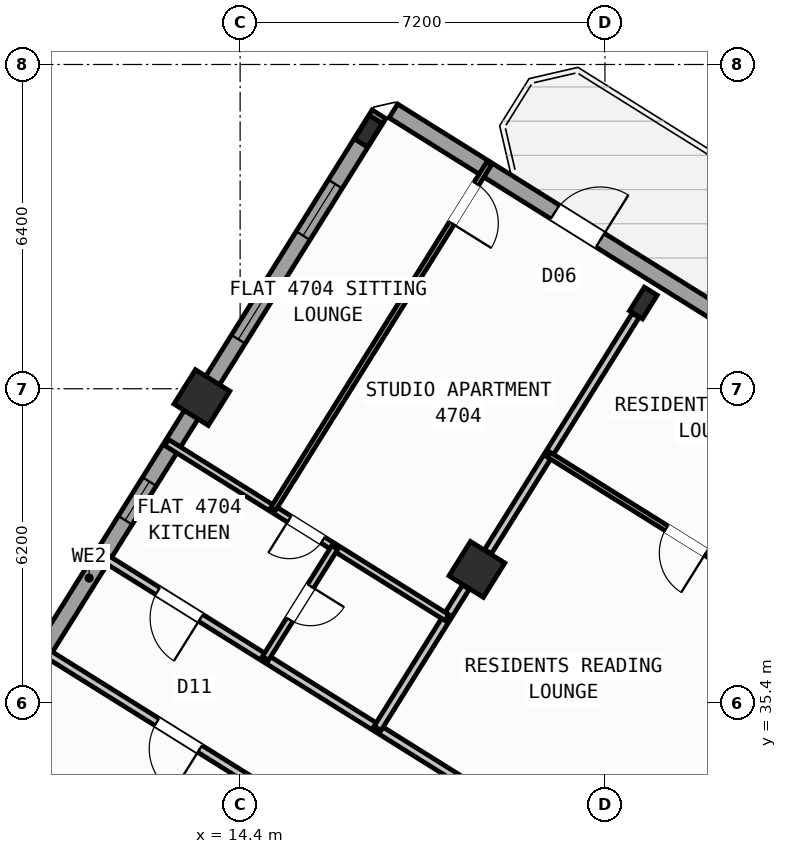
"""IFC4 building model, lengths in metres.
Left out: names, types, materials, properties, quantities, classifications, styles, units other than length and angle.
Written with IfcOpenShell. Run it as: python <this file> out.ifc"""

import sys

from ifc_helpers import new_model, si_unit, direction, frame, frame_2d, origin, origin_2d, place, context, subcontext, project, spatial, rectangle, hollow_rectangle, i_section, extrude, source, transform, mapped, element, fill, save


model = new_model("IFC4")
c1 = context("Model", 3, precision=1e-05, world=origin(), true_north=direction((0.0, 1.0)))
c2 = subcontext(c1, "Body", "Model", "MODEL_VIEW")
j1 = project(units=[si_unit("LENGTHUNIT", "METRE"), si_unit("PLANEANGLEUNIT", "RADIAN")], contexts=[c1])
p1 = place(None, origin())
s1 = spatial("IfcSite", under=j1, at=p1, CompositionType="ELEMENT")
p2 = place(p1, origin())
s2 = spatial("IfcBuilding", under=s1, at=p2, CompositionType="ELEMENT")
p3 = place(p2, frame((0.0, 0.0, 187.8)))
s3 = spatial("IfcBuildingStorey", under=s2, at=p3, CompositionType="ELEMENT", Elevation=187.8)
m1 = source(origin(), c2, "Body", "SweptSolid", [
    extrude(i_section(OverallWidth=0.3, OverallDepth=0.55, WebThickness=0.015, FlangeThickness=0.029, at=origin_2d()), origin(), (0.0, 0.0, 1.0), 3.6),
])
p4 = place(p3, frame((22.358, 43.292, 0.0), z_axis=(0.0, 0.0, 1.0), x_axis=(-0.848048096156, 0.529919264233, 0.0)))
e1 = element("IfcColumn", 1, at=p4, inside=s3, PredefinedType="COLUMN", context=c2, shape_type="MappedRepresentation", body=[
    mapped(m1, transform((0.0, 0.0, 0.0), scale=1.0)),
])
m2 = source(origin(), c2, "Body", "SweptSolid", [
    extrude(hollow_rectangle(XDim=0.8, YDim=0.8, WallThickness=0.032, at=origin_2d()), origin(), (0.0, 0.0, 1.0), 3.6),
])
p5 = place(p3, frame((19.073, 38.034, 0.0), z_axis=(0.0, 0.0, 1.0), x_axis=(-0.848048096156, 0.529919264233, 0.0)))
e2 = element("IfcColumn", 2, at=p5, inside=s3, PredefinedType="COLUMN", context=c2, shape_type="MappedRepresentation", body=[
    mapped(m2, transform((0.0, 0.0, 0.0), scale=1.0)),
])
p6 = place(p3, frame((16.931, 46.684, 0.0), z_axis=(0.0, 0.0, 1.0), x_axis=(-0.848048096156, 0.529919264233, 0.0)))
e3 = element("IfcColumn", 3, at=p6, inside=s3, PredefinedType="COLUMN", context=c2, shape_type="MappedRepresentation", body=[
    mapped(m1, transform((0.0, 0.0, 0.0), scale=1.0)),
])
p7 = place(p3, frame((13.646, 41.426, 0.0), z_axis=(0.0, 0.0, 1.0), x_axis=(-0.848048096156, 0.529919264233, 0.0)))
e4 = element("IfcColumn", 4, at=p7, inside=s3, PredefinedType="COLUMN", context=c2, shape_type="MappedRepresentation", body=[
    mapped(m2, transform((0.0, 0.0, 0.0), scale=1.0)),
])
p8 = place(p3, frame((5.7, 28.71, 0.0), z_axis=(0.0, 0.0, 1.0), x_axis=(0.529923711467, 0.8480453172, 0.0)))
e5 = element("IfcWall", 5, at=p8, inside=s3, PredefinedType="STANDARD", context=c2, shape_type="SweptSolid", body=[
    extrude(rectangle(XDim=21.587, YDim=0.32, at=frame_2d((10.794, 0.0))), origin(), (0.0, 0.0, 1.0), 2.825),
])
p9 = place(p8, frame((1.44, 0.0, 0.95)))
e6 = element("IfcOpeningElement", 6, at=p9, cuts=e5, PredefinedType="OPENING", context=c2, shape_type="SweptSolid", body=[
    extrude(rectangle(XDim=1.2, YDim=1.4, at=frame_2d((0.6, 0.7))), frame((0.0, 0.17, 0.0), z_axis=(0.0, -1.0, 0.0), x_axis=(1.0, 0.0, 0.0)), (0.0, 0.0, 1.0), 0.34),
])
p10 = place(p8, frame((4.545, 0.0, 0.85)))
e7 = element("IfcOpeningElement", 7, at=p10, cuts=e5, PredefinedType="OPENING", context=c2, shape_type="SweptSolid", body=[
    extrude(rectangle(XDim=1.8, YDim=1.5, at=frame_2d((0.9, 0.75))), frame((0.0, 0.17, 0.0), z_axis=(0.0, -1.0, 0.0), x_axis=(1.0, 0.0, 0.0)), (0.0, 0.0, 1.0), 0.34),
])
p11 = place(p8, frame((12.139, 0.0, 1.0)))
e8 = element("IfcOpeningElement", 8, at=p11, cuts=e5, PredefinedType="OPENING", context=c2, shape_type="SweptSolid", body=[
    extrude(rectangle(XDim=0.9, YDim=1.25, at=frame_2d((0.45, 0.625))), frame((0.0, 0.17, 0.0), z_axis=(0.0, -1.0, 0.0), x_axis=(1.0, 0.0, 0.0)), (0.0, 0.0, 1.0), 0.34),
])
p12 = place(p8, frame((16.35, 0.0, 0.95)))
e9 = element("IfcOpeningElement", 9, at=p12, cuts=e5, PredefinedType="OPENING", context=c2, shape_type="SweptSolid", body=[
    extrude(rectangle(XDim=1.2, YDim=1.4, at=frame_2d((0.6, 0.7))), frame((0.0, 0.17, 0.0), z_axis=(0.0, -1.0, 0.0), x_axis=(1.0, 0.0, 0.0)), (0.0, 0.0, 1.0), 0.34),
])
p13 = place(p8, frame((18.762, 0.0, 0.95)))
e10 = element("IfcOpeningElement", 10, at=p13, cuts=e5, PredefinedType="OPENING", context=c2, shape_type="SweptSolid", body=[
    extrude(rectangle(XDim=1.2, YDim=1.4, at=frame_2d((0.6, 0.7))), frame((0.0, 0.17, 0.0), z_axis=(0.0, -1.0, 0.0), x_axis=(1.0, 0.0, 0.0)), (0.0, 0.0, 1.0), 0.34),
])
p14 = place(p3, frame((17.424, 47.083, 0.0), z_axis=(0.0, 0.0, 1.0), x_axis=(0.848049927979, -0.529916332693, 0.0)))
e11 = element("IfcWall", 11, at=p14, inside=s3, PredefinedType="STANDARD", context=c2, shape_type="SweptSolid", body=[
    extrude(rectangle(XDim=29.223, YDim=0.32, at=frame_2d((14.612, 0.0))), origin(), (0.0, 0.0, 1.0), 3.35),
])
p15 = place(p14, frame((3.764, 0.0, 0.0)))
e12 = element("IfcOpeningElement", 12, at=p15, cuts=e11, PredefinedType="OPENING", context=c2, shape_type="SweptSolid", body=[
    extrude(rectangle(XDim=1.05, YDim=2.15, at=frame_2d((0.525, 1.075))), frame((0.0, 0.17, 0.0), z_axis=(0.0, -1.0, 0.0), x_axis=(1.0, 0.0, 0.0)), (0.0, 0.0, 1.0), 0.34),
])
p16 = place(p14, frame((8.344, 0.0, 0.8)))
e13 = element("IfcOpeningElement", 13, at=p16, cuts=e11, PredefinedType="OPENING", context=c2, shape_type="SweptSolid", body=[
    extrude(rectangle(XDim=2.1, YDim=1.55, at=frame_2d((1.05, 0.775))), frame((0.0, 0.17, 0.0), z_axis=(0.0, -1.0, 0.0), x_axis=(1.0, 0.0, 0.0)), (0.0, 0.0, 1.0), 0.34),
])
p17 = place(p14, frame((13.589, 0.0, 0.85)))
e14 = element("IfcOpeningElement", 14, at=p17, cuts=e11, PredefinedType="OPENING", context=c2, shape_type="SweptSolid", body=[
    extrude(rectangle(XDim=1.8, YDim=1.5, at=frame_2d((0.9, 0.75))), frame((0.0, 0.17, 0.0), z_axis=(0.0, -1.0, 0.0), x_axis=(1.0, 0.0, 0.0)), (0.0, 0.0, 1.0), 0.34),
])
p18 = place(p14, frame((17.104, 0.0, 0.95)))
e15 = element("IfcOpeningElement", 15, at=p18, cuts=e11, PredefinedType="OPENING", context=c2, shape_type="SweptSolid", body=[
    extrude(rectangle(XDim=1.2, YDim=1.4, at=frame_2d((0.6, 0.7))), frame((0.0, 0.17, 0.0), z_axis=(0.0, -1.0, 0.0), x_axis=(1.0, 0.0, 0.0)), (0.0, 0.0, 1.0), 0.34),
])
p19 = place(p14, frame((21.214, 0.0, 0.95)))
e16 = element("IfcOpeningElement", 16, at=p19, cuts=e11, PredefinedType="OPENING", context=c2, shape_type="SweptSolid", body=[
    extrude(rectangle(XDim=1.2, YDim=1.4, at=frame_2d((0.6, 0.7))), frame((0.0, 0.17, 0.0), z_axis=(0.0, -1.0, 0.0), x_axis=(1.0, 0.0, 0.0)), (0.0, 0.0, 1.0), 0.34),
])
p20 = place(p14, frame((25.853, 0.0, 0.95)))
e17 = element("IfcOpeningElement", 17, at=p20, cuts=e11, PredefinedType="OPENING", context=c2, shape_type="SweptSolid", body=[
    extrude(rectangle(XDim=1.2, YDim=1.4, at=frame_2d((0.6, 0.7))), frame((0.0, 0.17, 0.0), z_axis=(0.0, -1.0, 0.0), x_axis=(1.0, 0.0, 0.0)), (0.0, 0.0, 1.0), 0.34),
])
p21 = place(p3, frame((25.754, 29.497, 0.0), z_axis=(0.0, 0.0, 1.0), x_axis=(-0.848045850158, 0.529922858565, 0.0)))
e18 = element("IfcWall", 18, at=p21, inside=s3, PredefinedType="PARTITIONING", context=c2, shape_type="SweptSolid", body=[
    extrude(rectangle(XDim=16.73, YDim=0.16, at=frame_2d((8.365, 0.0))), origin(), (0.0, 0.0, 1.0), 3.34),
])
p22 = place(p21, frame((2.22, 0.0, 0.0)))
e19 = element("IfcOpeningElement", 19, at=p22, cuts=e18, PredefinedType="OPENING", context=c2, shape_type="SweptSolid", body=[
    extrude(rectangle(XDim=0.86, YDim=2.05, at=frame_2d((0.43, 1.025))), frame((0.0, 0.09, 0.0), z_axis=(0.0, -1.0, 0.0), x_axis=(1.0, 0.0, 0.0)), (0.0, 0.0, 1.0), 0.18),
])
p23 = place(p21, frame((6.49, 0.0, 0.0)))
e20 = element("IfcOpeningElement", 20, at=p23, cuts=e18, PredefinedType="OPENING", context=c2, shape_type="SweptSolid", body=[
    extrude(rectangle(XDim=1.0, YDim=2.1, at=frame_2d((0.5, 1.05))), frame((0.0, 0.09, 0.0), z_axis=(0.0, -1.0, 0.0), x_axis=(1.0, 0.0, 0.0)), (0.0, 0.0, 1.0), 0.18),
])
p24 = place(p21, frame((14.304, 0.0, 0.0)))
e21 = element("IfcOpeningElement", 21, at=p24, cuts=e18, PredefinedType="OPENING", context=c2, shape_type="SweptSolid", body=[
    extrude(rectangle(XDim=1.0, YDim=2.1, at=frame_2d((0.5, 1.05))), frame((0.0, 0.09, 0.0), z_axis=(0.0, -1.0, 0.0), x_axis=(1.0, 0.0, 0.0)), (0.0, 0.0, 1.0), 0.18),
])
p25 = place(p3, frame((24.588, 27.631, 0.0), z_axis=(0.0, 0.0, 1.0), x_axis=(-0.848041752158, 0.529929416617, 0.0)))
e22 = element("IfcWall", 22, at=p25, inside=s3, PredefinedType="PARTITIONING", context=c2, shape_type="SweptSolid", body=[
    extrude(rectangle(XDim=16.73, YDim=0.16, at=frame_2d((8.365, 0.0))), origin(), (0.0, 0.0, 1.0), 3.34),
])
p26 = place(p25, frame((2.22, 0.0, 0.0)))
e23 = element("IfcOpeningElement", 23, at=p26, cuts=e22, PredefinedType="OPENING", context=c2, shape_type="SweptSolid", body=[
    extrude(rectangle(XDim=0.86, YDim=2.05, at=frame_2d((0.43, 1.025))), frame((0.0, 0.09, 0.0), z_axis=(0.0, -1.0, 0.0), x_axis=(1.0, 0.0, 0.0)), (0.0, 0.0, 1.0), 0.18),
])
p27 = place(p25, frame((7.82, 0.0, 0.0)))
e24 = element("IfcOpeningElement", 24, at=p27, cuts=e22, PredefinedType="OPENING", context=c2, shape_type="SweptSolid", body=[
    extrude(rectangle(XDim=1.0, YDim=2.1, at=frame_2d((0.5, 1.05))), frame((0.0, 0.09, 0.0), z_axis=(0.0, -1.0, 0.0), x_axis=(1.0, 0.0, 0.0)), (0.0, 0.0, 1.0), 0.18),
])
p28 = place(p25, frame((12.95, 0.0, 0.0)))
e25 = element("IfcOpeningElement", 25, at=p28, cuts=e22, PredefinedType="OPENING", context=c2, shape_type="SweptSolid", body=[
    extrude(rectangle(XDim=1.0, YDim=2.1, at=frame_2d((0.5, 1.05))), frame((0.0, 0.09, 0.0), z_axis=(0.0, -1.0, 0.0), x_axis=(1.0, 0.0, 0.0)), (0.0, 0.0, 1.0), 0.18),
])
p29 = place(p3, frame((24.282, 34.293, 0.0), z_axis=(0.0, 0.0, 1.0), x_axis=(-0.529938869374, -0.84803584519, 0.0)))
e26 = element("IfcWall", 26, at=p29, inside=s3, PredefinedType="PARTITIONING", context=c2, shape_type="SweptSolid", body=[
    extrude(rectangle(XDim=3.288, YDim=0.16, at=frame_2d((1.644, 0.0))), origin(), (0.0, 0.0, 1.0), 2.825),
])
p30 = place(p3, frame((22.206, 43.049, 0.0), z_axis=(0.0, 0.0, 1.0), x_axis=(-0.529919150083, -0.848048167486, 0.0)))
e27 = element("IfcWall", 27, at=p30, inside=s3, PredefinedType="PARTITIONING", context=c2, shape_type="SweptSolid", body=[
    extrude(rectangle(XDim=5.501, YDim=0.16, at=frame_2d((2.75, 0.0))), origin(), (0.0, 0.0, 1.0), 2.825),
])
p31 = place(p3, frame((18.854, 37.685, 0.0), z_axis=(0.0, 0.0, 1.0), x_axis=(-0.529885466561, -0.848069214349, 0.0)))
e28 = element("IfcWall", 28, at=p31, inside=s3, PredefinedType="PARTITIONING", context=c2, shape_type="SweptSolid", body=[
    extrude(rectangle(XDim=3.288, YDim=0.16, at=frame_2d((1.644, 0.0))), origin(), (0.0, 0.0, 1.0), 2.825),
])
p32 = place(p3, frame((25.916, 36.909, 0.0), z_axis=(0.0, 0.0, 1.0), x_axis=(-0.848056163074, 0.529906354247, 0.0)))
e29 = element("IfcWall", 29, at=p32, inside=s3, PredefinedType="PARTITIONING", context=c2, shape_type="SweptSolid", body=[
    extrude(rectangle(XDim=6.4, YDim=0.11, at=frame_2d((3.2, 0.0))), origin(), (0.0, 0.0, 1.0), 3.34),
])
p33 = place(p32, frame((2.74, 0.0, 0.0)))
e30 = element("IfcOpeningElement", 30, at=p33, cuts=e29, PredefinedType="OPENING", context=c2, shape_type="SweptSolid", body=[
    extrude(rectangle(XDim=0.92, YDim=2.08, at=frame_2d((0.46, 1.04))), frame((0.0, 0.065, 0.0), z_axis=(0.0, -1.0, 0.0), x_axis=(1.0, 0.0, 0.0)), (0.0, 0.0, 1.0), 0.13),
])
p34 = place(p3, frame((18.479, 37.084, 0.0), z_axis=(0.0, 0.0, 1.0), x_axis=(-0.848048787466, 0.529918157905, 0.0)))
e31 = element("IfcWall", 31, at=p34, inside=s3, PredefinedType="PLUMBINGWALL", context=c2, shape_type="SweptSolid", body=[
    extrude(rectangle(XDim=6.52, YDim=0.14, at=frame_2d((3.26, 0.0))), origin(), (0.0, 0.0, 1.0), 3.34),
])
p35 = place(p34, frame((2.885, 0.0, 0.0)))
e32 = element("IfcOpeningElement", 32, at=p35, cuts=e31, PredefinedType="OPENING", context=c2, shape_type="SweptSolid", body=[
    extrude(rectangle(XDim=0.78, YDim=2.05, at=frame_2d((0.39, 1.025))), frame((0.0, 0.08, 0.0), z_axis=(0.0, -1.0, 0.0), x_axis=(1.0, 0.0, 0.0)), (0.0, 0.0, 1.0), 0.16),
])
p36 = place(p3, frame((16.268, 38.467, 0.0), z_axis=(0.0, 0.0, 1.0), x_axis=(-0.529913878929, -0.848051461244, 0.0)))
e33 = element("IfcWall", 33, at=p36, inside=s3, PredefinedType="PLUMBINGWALL", context=c2, shape_type="SweptSolid", body=[
    extrude(rectangle(XDim=2.58, YDim=0.14, at=frame_2d((1.29, 0.0))), origin(), (0.0, 0.0, 1.0), 3.34),
])
p37 = place(p36, frame((0.9, 0.0, 0.0)))
e34 = element("IfcOpeningElement", 34, at=p37, cuts=e33, PredefinedType="OPENING", context=c2, shape_type="SweptSolid", body=[
    extrude(rectangle(XDim=0.78, YDim=2.05, at=frame_2d((0.39, 1.025))), frame((0.0, 0.08, 0.0), z_axis=(0.0, -1.0, 0.0), x_axis=(1.0, 0.0, 0.0)), (0.0, 0.0, 1.0), 0.16),
])
p38 = place(p3, frame((19.312, 46.045, 0.0), z_axis=(0.0, 0.0, 1.0), x_axis=(-0.529933431478, -0.848039243315, 0.0)))
e35 = element("IfcWall", 35, at=p38, inside=s3, PredefinedType="PARTITIONING", context=c2, shape_type="SweptSolid", body=[
    extrude(rectangle(XDim=8.04, YDim=0.11, at=frame_2d((4.02, 0.0))), origin(), (0.0, 0.0, 1.0), 2.995),
])
p39 = place(p38, frame((0.47, 0.0, 0.0)))
e36 = element("IfcOpeningElement", 36, at=p39, cuts=e35, PredefinedType="OPENING", context=c2, shape_type="SweptSolid", body=[
    extrude(rectangle(XDim=0.92, YDim=2.08, at=frame_2d((0.46, 1.04))), frame((0.0, 0.065, 0.0), z_axis=(0.0, -1.0, 0.0), x_axis=(1.0, 0.0, 0.0)), (0.0, 0.0, 1.0), 0.13),
])
m3 = source(origin(), c2, "Body", "SweptSolid", [
    extrude(rectangle(XDim=1.05, YDim=2.15, at=frame_2d((0.525, 1.075))), frame((0.0, 0.025, 0.0), z_axis=(0.0, -1.0, 0.0), x_axis=(1.0, 0.0, 0.0)), (0.0, 0.0, 1.0), 0.05),
])
p40 = place(p15, origin())
e37 = element("IfcDoor", 37, at=p40, inside=s3, OperationType="SINGLE_SWING_RIGHT", PredefinedType="DOOR", context=c2, shape_type="MappedRepresentation", body=[
    mapped(m3, transform((0.0, 0.0, 0.0), scale=1.0)),
])
fill(e12, e37)
m4 = source(origin(), c2, "Body", "SweptSolid", [
    extrude(rectangle(XDim=0.9, YDim=1.25, at=frame_2d((0.45, 0.625))), frame((0.0, 0.03, 0.0), z_axis=(0.0, -1.0, 0.0), x_axis=(1.0, 0.0, 0.0)), (0.0, 0.0, 1.0), 0.06),
])
p41 = place(p11, origin())
e38 = element("IfcWindow", 38, at=p41, inside=s3, PartitioningType="SINGLE_PANEL", PredefinedType="WINDOW", context=c2, shape_type="MappedRepresentation", body=[
    mapped(m4, transform((0.0, 0.0, 0.0), scale=1.0)),
])
fill(e8, e38)
m5 = source(origin(), c2, "Body", "SweptSolid", [
    extrude(rectangle(XDim=1.2, YDim=1.4, at=frame_2d((0.6, 0.7))), frame((0.0, 0.03, 0.0), z_axis=(0.0, -1.0, 0.0), x_axis=(1.0, 0.0, 0.0)), (0.0, 0.0, 1.0), 0.06),
])
p42 = place(p12, origin())
e39 = element("IfcWindow", 39, at=p42, inside=s3, PartitioningType="SINGLE_PANEL", PredefinedType="WINDOW", context=c2, shape_type="MappedRepresentation", body=[
    mapped(m5, transform((0.0, 0.0, 0.0), scale=1.0)),
])
fill(e9, e39)
p43 = place(p13, origin())
e40 = element("IfcWindow", 40, at=p43, inside=s3, PartitioningType="SINGLE_PANEL", PredefinedType="WINDOW", context=c2, shape_type="MappedRepresentation", body=[
    mapped(m5, transform((0.0, 0.0, 0.0), scale=1.0)),
])
fill(e10, e40)
m6 = source(origin(), c2, "Body", "SweptSolid", [
    extrude(rectangle(XDim=1.0, YDim=2.1, at=frame_2d((0.5, 1.05))), frame((0.0, 0.025, 0.0), z_axis=(0.0, -1.0, 0.0), x_axis=(1.0, 0.0, 0.0)), (0.0, 0.0, 1.0), 0.05),
])
p44 = place(p28, origin())
e41 = element("IfcDoor", 41, at=p44, inside=s3, OperationType="SINGLE_SWING_LEFT", PredefinedType="DOOR", context=c2, shape_type="MappedRepresentation", body=[
    mapped(m6, transform((0.0, 0.0, 0.0), scale=1.0)),
])
fill(e25, e41)
m7 = source(origin(), c2, "Body", "SweptSolid", [
    extrude(rectangle(XDim=0.92, YDim=2.08, at=frame_2d((0.46, 1.04))), frame((0.0, 0.025, 0.0), z_axis=(0.0, -1.0, 0.0), x_axis=(1.0, 0.0, 0.0)), (0.0, 0.0, 1.0), 0.05),
])
p45 = place(p33, origin())
e42 = element("IfcDoor", 42, at=p45, inside=s3, OperationType="SINGLE_SWING_LEFT", PredefinedType="DOOR", context=c2, shape_type="MappedRepresentation", body=[
    mapped(m7, transform((0.0, 0.0, 0.0), scale=1.0)),
])
fill(e30, e42)
p46 = place(p39, origin())
e43 = element("IfcDoor", 43, at=p46, inside=s3, OperationType="SINGLE_SWING_RIGHT", PredefinedType="DOOR", context=c2, shape_type="MappedRepresentation", body=[
    mapped(m7, transform((0.0, 0.0, 0.0), scale=1.0)),
])
fill(e36, e43)
p47 = place(p24, origin())
e44 = element("IfcDoor", 44, at=p47, inside=s3, OperationType="SINGLE_SWING_LEFT", PredefinedType="DOOR", context=c2, shape_type="MappedRepresentation", body=[
    mapped(m6, transform((0.0, 0.0, 0.0), scale=1.0)),
])
fill(e21, e44)
m8 = source(origin(), c2, "Body", "SweptSolid", [
    extrude(rectangle(XDim=0.78, YDim=2.05, at=frame_2d((0.39, 1.025))), frame((0.0, 0.025, 0.0), z_axis=(0.0, -1.0, 0.0), x_axis=(1.0, 0.0, 0.0)), (0.0, 0.0, 1.0), 0.05),
])
p48 = place(p35, origin())
e45 = element("IfcDoor", 45, at=p48, inside=s3, OperationType="SINGLE_SWING_RIGHT", PredefinedType="DOOR", context=c2, shape_type="MappedRepresentation", body=[
    mapped(m8, transform((0.0, 0.0, 0.0), scale=1.0)),
])
fill(e32, e45)
p49 = place(p37, origin())
e46 = element("IfcDoor", 46, at=p49, inside=s3, OperationType="SINGLE_SWING_LEFT", PredefinedType="DOOR", context=c2, shape_type="MappedRepresentation", body=[
    mapped(m8, transform((0.0, 0.0, 0.0), scale=1.0)),
])
fill(e34, e46)
save(model, sys.argv[1])
